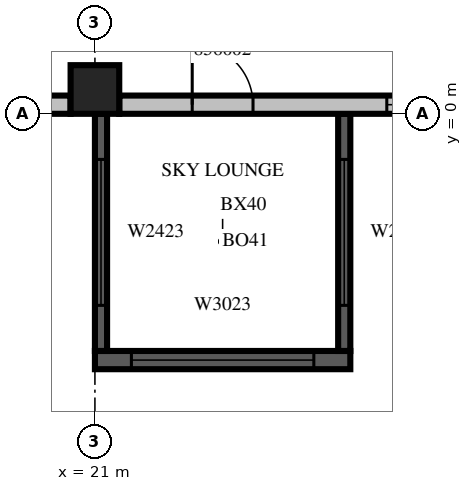
"""IFC4 building model, lengths in metres.
Left out: names, types, materials, properties, quantities, classifications, styles, units other than length and angle.
Written with IfcOpenShell. Run it as: python <this file> out.ifc"""

import sys

from ifc_helpers import new_model, si_unit, direction, frame, frame_2d, origin, origin_2d, place, context, subcontext, project, spatial, rectangle, extrude, source, transform, mapped, element, fill, save


model = new_model("IFC4")
c1 = context("Model", 3, precision=1e-05, world=origin(), true_north=direction((0.0, 1.0)))
c2 = subcontext(c1, "Body", "Model", "MODEL_VIEW")
j1 = project(units=[si_unit("LENGTHUNIT", "METRE"), si_unit("PLANEANGLEUNIT", "RADIAN")], contexts=[c1])
p1 = place(None, origin())
s1 = spatial("IfcSite", under=j1, at=p1, CompositionType="ELEMENT")
p2 = place(p1, origin())
s2 = spatial("IfcBuilding", under=s1, at=p2, CompositionType="ELEMENT")
p3 = place(p2, frame((0.0, 0.0, 246.2)))
s3 = spatial("IfcBuildingStorey", under=s2, at=p3, CompositionType="ELEMENT", Elevation=246.2)
m1 = source(origin(), c2, "Body", "SweptSolid", [
    extrude(rectangle(XDim=0.8, YDim=0.8, at=origin_2d()), origin(), (0.0, 0.0, 1.0), 3.8),
])
p4 = place(p3, frame((21.0, 0.4, 0.0), z_axis=(0.0, 0.0, 1.0), x_axis=(1.0, 0.0, 0.0)))
e1 = element("IfcColumn", 1, at=p4, inside=s3, PredefinedType="COLUMN", context=c2, shape_type="MappedRepresentation", body=[
    mapped(m1, transform((0.0, 0.0, 0.0), scale=1.0)),
])
m2 = source(origin(), c2, "Body", "SweptSolid", [
    extrude(rectangle(XDim=4.2, YDim=0.3, at=frame_2d((2.1, 0.0))), origin(), (0.0, 0.0, 1.0), 3.4),
])
p5 = place(p3, frame((21.0, -4.05, 0.0), z_axis=(0.0, 0.0, 1.0), x_axis=(1.0, 0.0, 0.0)))
e2 = element("IfcWall", 2, at=p5, inside=s3, PredefinedType="SOLIDWALL", context=c2, shape_type="MappedRepresentation", body=[
    mapped(m2, transform((0.0, 0.0, 0.0), scale=1.0)),
])
m3 = source(origin(), c2, "Body", "SweptSolid", [
    extrude(rectangle(XDim=3.0, YDim=2.3, at=frame_2d((1.5, 1.15))), frame((0.0, 0.16, 0.0), z_axis=(0.0, -1.0, 0.0), x_axis=(1.0, 0.0, 0.0)), (0.0, 0.0, 1.0), 0.32),
])
p6 = place(p5, frame((0.6, 0.0, 0.6)))
e3 = element("IfcOpeningElement", 3, at=p6, cuts=e2, PredefinedType="OPENING", context=c2, shape_type="MappedRepresentation", body=[
    mapped(m3, transform((0.0, 0.0, 0.0), scale=1.0)),
])
m4 = source(origin(), c2, "Body", "SweptSolid", [
    extrude(rectangle(XDim=3.9, YDim=0.2, at=frame_2d((1.95, 0.0))), origin(), (0.0, 0.0, 1.0), 3.4),
])
p7 = place(p3, frame((21.1, 0.0, 0.0), z_axis=(0.0, 0.0, 1.0), x_axis=(0.0, -1.0, 0.0)))
e4 = element("IfcWall", 4, at=p7, inside=s3, PredefinedType="SOLIDWALL", context=c2, shape_type="MappedRepresentation", body=[
    mapped(m4, transform((0.0, 0.0, 0.0), scale=1.0)),
])
m5 = source(origin(), c2, "Body", "SweptSolid", [
    extrude(rectangle(XDim=2.4, YDim=2.3, at=frame_2d((1.2, 1.15))), frame((0.0, 0.11, 0.0), z_axis=(0.0, -1.0, 0.0), x_axis=(1.0, 0.0, 0.0)), (0.0, 0.0, 1.0), 0.22),
])
p8 = place(p7, frame((0.75, 0.0, 0.6)))
e5 = element("IfcOpeningElement", 5, at=p8, cuts=e4, PredefinedType="OPENING", context=c2, shape_type="MappedRepresentation", body=[
    mapped(m5, transform((0.0, 0.0, 0.0), scale=1.0)),
])
p9 = place(p3, frame((25.1, 0.0, 0.0), z_axis=(0.0, 0.0, 1.0), x_axis=(0.0, -1.0, 0.0)))
e6 = element("IfcWall", 6, at=p9, inside=s3, PredefinedType="SOLIDWALL", context=c2, shape_type="MappedRepresentation", body=[
    mapped(m4, transform((0.0, 0.0, 0.0), scale=1.0)),
])
p10 = place(p9, frame((0.75, 0.0, 0.6)))
e7 = element("IfcOpeningElement", 7, at=p10, cuts=e6, PredefinedType="OPENING", context=c2, shape_type="MappedRepresentation", body=[
    mapped(m5, transform((0.0, 0.0, 0.0), scale=1.0)),
])
m6 = source(origin(), c2, "Body", "SweptSolid", [
    extrude(rectangle(XDim=9.7, YDim=0.3, at=frame_2d((4.85, 0.0))), origin(), (0.0, 0.0, 1.0), 3.4),
])
p11 = place(p3, frame((10.9, 0.15, 0.0), z_axis=(0.0, 0.0, 1.0), x_axis=(1.0, 0.0, 0.0)))
e8 = element("IfcWall", 8, at=p11, inside=s3, PredefinedType="STANDARD", context=c2, shape_type="MappedRepresentation", body=[
    mapped(m6, transform((0.0, 0.0, 0.0), scale=1.0)),
])
m7 = source(origin(), c2, "Body", "SweptSolid", [
    extrude(rectangle(XDim=3.6, YDim=2.3, at=frame_2d((1.8, 1.15))), frame((0.0, 0.16, 0.0), z_axis=(0.0, -1.0, 0.0), x_axis=(1.0, 0.0, 0.0)), (0.0, 0.0, 1.0), 0.32),
])
p12 = place(p11, frame((5.675, 0.0, 0.6)))
e9 = element("IfcOpeningElement", 9, at=p12, cuts=e8, PredefinedType="OPENING", context=c2, shape_type="MappedRepresentation", body=[
    mapped(m7, transform((0.0, 0.0, 0.0), scale=1.0)),
])
m8 = source(origin(), c2, "Body", "SweptSolid", [
    extrude(rectangle(XDim=1.0, YDim=2.1, at=frame_2d((0.5, 1.05))), frame((0.0, 0.16, 0.0), z_axis=(0.0, -1.0, 0.0), x_axis=(1.0, 0.0, 0.0)), (0.0, 0.0, 1.0), 0.32),
])
p13 = place(p11, frame((1.725, 0.0, 0.0)))
e10 = element("IfcOpeningElement", 10, at=p13, cuts=e8, PredefinedType="OPENING", context=c2, shape_type="MappedRepresentation", body=[
    mapped(m8, transform((0.0, 0.0, 0.0), scale=1.0)),
])
m9 = source(origin(), c2, "Body", "SweptSolid", [
    extrude(rectangle(XDim=7.6, YDim=0.3, at=frame_2d((3.8, 0.0))), origin(), (0.0, 0.0, 1.0), 3.4),
])
p14 = place(p3, frame((21.4, 0.15, 0.0), z_axis=(0.0, 0.0, 1.0), x_axis=(1.0, 0.0, 0.0)))
e11 = element("IfcWall", 11, at=p14, inside=s3, PredefinedType="STANDARD", context=c2, shape_type="MappedRepresentation", body=[
    mapped(m9, transform((0.0, 0.0, 0.0), scale=1.0)),
])
p15 = place(p14, frame((4.4, 0.0, 0.6)))
e12 = element("IfcOpeningElement", 12, at=p15, cuts=e11, PredefinedType="OPENING", context=c2, shape_type="MappedRepresentation", body=[
    mapped(m3, transform((0.0, 0.0, 0.0), scale=1.0)),
])
p16 = place(p14, frame((1.2, 0.0, 0.0)))
e13 = element("IfcOpeningElement", 13, at=p16, cuts=e11, PredefinedType="OPENING", context=c2, shape_type="MappedRepresentation", body=[
    mapped(m8, transform((0.0, 0.0, 0.0), scale=1.0)),
])
m10 = source(origin(), c2, "Body", "SweptSolid", [
    extrude(rectangle(XDim=3.0, YDim=2.3, at=frame_2d((1.5, 1.15))), frame((0.0, 0.03, 0.0), z_axis=(0.0, -1.0, 0.0), x_axis=(1.0, 0.0, 0.0)), (0.0, 0.0, 1.0), 0.06),
])
p17 = place(p6, origin())
e14 = element("IfcWindow", 14, at=p17, inside=s3, PartitioningType="SINGLE_PANEL", PredefinedType="WINDOW", context=c2, shape_type="MappedRepresentation", body=[
    mapped(m10, transform((0.0, 0.0, 0.0), scale=1.0)),
])
fill(e3, e14)
m11 = source(origin(), c2, "Body", "SweptSolid", [
    extrude(rectangle(XDim=2.4, YDim=2.3, at=frame_2d((1.2, 1.15))), frame((0.0, 0.03, 0.0), z_axis=(0.0, -1.0, 0.0), x_axis=(1.0, 0.0, 0.0)), (0.0, 0.0, 1.0), 0.06),
])
p18 = place(p8, origin())
e15 = element("IfcWindow", 15, at=p18, inside=s3, PartitioningType="SINGLE_PANEL", PredefinedType="WINDOW", context=c2, shape_type="MappedRepresentation", body=[
    mapped(m11, transform((0.0, 0.0, 0.0), scale=1.0)),
])
fill(e5, e15)
p19 = place(p10, origin())
e16 = element("IfcWindow", 16, at=p19, inside=s3, PartitioningType="SINGLE_PANEL", PredefinedType="WINDOW", context=c2, shape_type="MappedRepresentation", body=[
    mapped(m11, transform((0.0, 0.0, 0.0), scale=1.0)),
])
fill(e7, e16)
p20 = place(p15, origin())
e17 = element("IfcWindow", 17, at=p20, inside=s3, PartitioningType="SINGLE_PANEL", PredefinedType="WINDOW", context=c2, shape_type="MappedRepresentation", body=[
    mapped(m10, transform((0.0, 0.0, 0.0), scale=1.0)),
])
fill(e12, e17)
m12 = source(origin(), c2, "Body", "SweptSolid", [
    extrude(rectangle(XDim=1.0, YDim=2.1, at=frame_2d((0.5, 1.05))), frame((0.0, 0.025, 0.0), z_axis=(0.0, -1.0, 0.0), x_axis=(1.0, 0.0, 0.0)), (0.0, 0.0, 1.0), 0.05),
])
p21 = place(p16, origin())
e18 = element("IfcDoor", 18, at=p21, inside=s3, OperationType="SINGLE_SWING_LEFT", PredefinedType="DOOR", context=c2, shape_type="MappedRepresentation", body=[
    mapped(m12, transform((0.0, 0.0, 0.0), scale=1.0)),
])
fill(e13, e18)
save(model, sys.argv[1])
